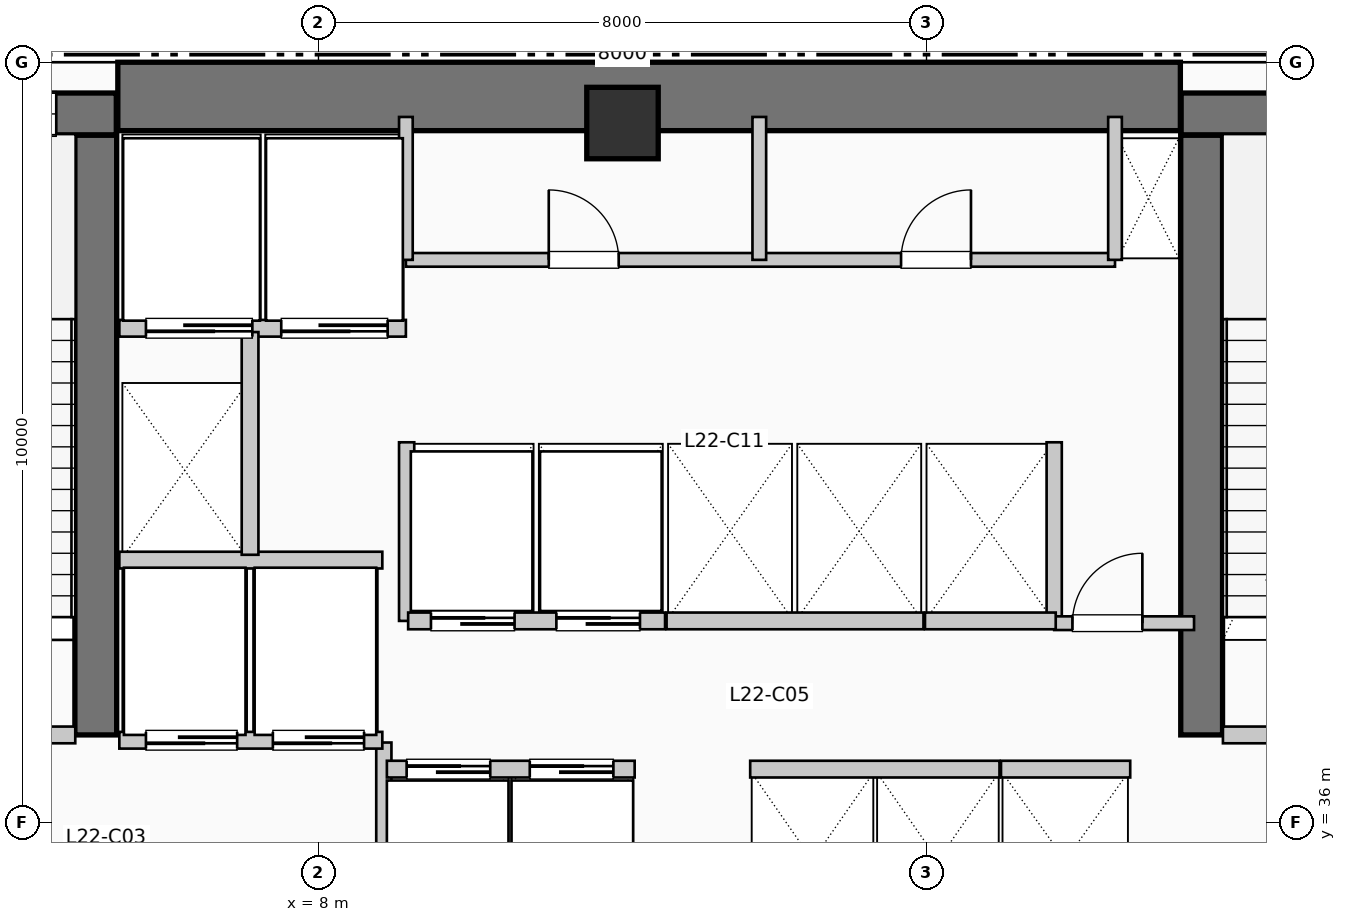
"""IFC4 building model, lengths in metres.
Left out: names, types, materials, properties, quantities, classifications, styles, units other than length and angle.
Written with IfcOpenShell. Run it as: python <this file> out.ifc"""

import sys

from ifc_helpers import new_model, si_unit, direction, frame, frame_2d, origin, origin_2d, place, context, subcontext, project, spatial, rectangle, extrude, element, fill, save


model = new_model("IFC4")
c1 = context("Model", 3, precision=1e-05, world=origin(), true_north=direction((0.0, 1.0)))
c2 = subcontext(c1, "Body", "Model", "MODEL_VIEW")
j1 = project(units=[si_unit("LENGTHUNIT", "METRE"), si_unit("PLANEANGLEUNIT", "RADIAN")], contexts=[c1])
p1 = place(None, origin())
s1 = spatial("IfcSite", under=j1, at=p1, CompositionType="ELEMENT")
p2 = place(p1, origin())
s2 = spatial("IfcBuilding", under=s1, at=p2, CompositionType="ELEMENT")
p3 = place(p2, frame((0.0, 0.0, 93.72)))
s3 = spatial("IfcBuildingStorey", under=s2, at=p3, CompositionType="ELEMENT", Elevation=93.72)
p4 = place(p3, frame((5.36, 45.55, 0.0), z_axis=(0.0, 0.0, 1.0), x_axis=(1.0, 0.0, 0.0)))
e1 = element("IfcWall", 1, at=p4, inside=s3, PredefinedType="SHEAR", context=c2, shape_type="SweptSolid", body=[
    extrude(rectangle(XDim=13.98, YDim=0.9, at=frame_2d((6.99, 0.0))), origin(), (0.0, 0.0, 1.0), 4.95),
])
p5 = place(p3, frame((5.07, 37.15, 0.0), z_axis=(0.0, 0.0, 1.0), x_axis=(0.0, 1.0, 0.0)))
e2 = element("IfcWall", 2, at=p5, inside=s3, PredefinedType="SHEAR", context=c2, shape_type="SweptSolid", body=[
    extrude(rectangle(XDim=7.89, YDim=0.55, at=frame_2d((3.945, 0.0))), origin(), (0.0, 0.0, 1.0), 4.95),
])
p6 = place(p3, frame((1.1, 45.32, 0.0), z_axis=(0.0, 0.0, 1.0), x_axis=(1.0, 0.0, 0.0)))
e3 = element("IfcWall", 3, at=p6, inside=s3, PredefinedType="SHEAR", context=c2, shape_type="SweptSolid", body=[
    extrude(rectangle(XDim=4.24, YDim=0.55, at=frame_2d((2.12, 0.0))), origin(), (0.0, 0.0, 1.0), 4.95),
])
p7 = place(p6, frame((2.05, 0.0, 1.05)))
e4 = element("IfcOpeningElement", 4, at=p7, cuts=e3, PredefinedType="OPENING", context=c2, shape_type="SweptSolid", body=[
    extrude(rectangle(XDim=1.4, YDim=1.8, at=frame_2d((0.7, 0.9))), frame((0.0, 0.285, 0.0), z_axis=(0.0, -1.0, 0.0), x_axis=(1.0, 0.0, 0.0)), (0.0, 0.0, 1.0), 0.57),
])
p8 = place(p3, frame((19.62, 37.15, 0.0), z_axis=(0.0, 0.0, 1.0), x_axis=(0.0, 1.0, 0.0)))
e5 = element("IfcWall", 5, at=p8, inside=s3, PredefinedType="SHEAR", context=c2, shape_type="SweptSolid", body=[
    extrude(rectangle(XDim=7.89, YDim=0.55, at=frame_2d((3.945, 0.0))), origin(), (0.0, 0.0, 1.0), 4.95),
])
p9 = place(p3, frame((19.35, 45.32, 0.0), z_axis=(0.0, 0.0, 1.0), x_axis=(1.0, 0.0, 0.0)))
e6 = element("IfcWall", 6, at=p9, inside=s3, PredefinedType="SHEAR", context=c2, shape_type="SweptSolid", body=[
    extrude(rectangle(XDim=3.69, YDim=0.55, at=frame_2d((1.845, 0.0))), origin(), (0.0, 0.0, 1.0), 4.95),
])
p10 = place(p9, frame((1.15, 0.0, 1.05)))
e7 = element("IfcOpeningElement", 7, at=p10, cuts=e6, PredefinedType="OPENING", context=c2, shape_type="SweptSolid", body=[
    extrude(rectangle(XDim=1.4, YDim=1.8, at=frame_2d((0.7, 0.9))), frame((0.0, 0.285, 0.0), z_axis=(0.0, -1.0, 0.0), x_axis=(1.0, 0.0, 0.0)), (0.0, 0.0, 1.0), 0.57),
])
p11 = place(p3, frame((12.0, 45.2, 0.0), z_axis=(0.0, 0.0, 1.0), x_axis=(1.0, 0.0, 0.0)))
e8 = element("IfcColumn", 8, at=p11, inside=s3, PredefinedType="COLUMN", context=c2, shape_type="SweptSolid", body=[
    extrude(rectangle(XDim=0.94, YDim=0.94, at=origin_2d()), origin(), (0.0, 0.0, 1.0), 4.95),
])
p12 = place(p3, frame((1.65, 37.15, 0.0), z_axis=(0.0, 0.0, 1.0), x_axis=(1.0, 0.0, 0.0)))
e9 = element("IfcWall", 9, at=p12, inside=s3, PredefinedType="PARTITIONING", context=c2, shape_type="SweptSolid", body=[
    extrude(rectangle(XDim=3.15, YDim=0.22, at=frame_2d((1.575, 0.0))), origin(), (0.0, 0.0, 1.0), 4.7),
])
p13 = place(p12, frame((2.05, 0.0, 0.0), z_axis=(0.0, 0.0, 1.0), x_axis=(-1.0, 0.0, 0.0)))
e10 = element("IfcOpeningElement", 10, at=p13, cuts=e9, PredefinedType="OPENING", context=c2, shape_type="SweptSolid", body=[
    extrude(rectangle(XDim=1.05, YDim=2.15, at=frame_2d((0.525, 1.075))), frame((0.0, 0.12, 0.0), z_axis=(0.0, -1.0, 0.0), x_axis=(1.0, 0.0, 0.0)), (0.0, 0.0, 1.0), 0.24),
])
p14 = place(p3, frame((8.86, 34.55, 0.0), z_axis=(0.0, 0.0, 1.0), x_axis=(0.0, 1.0, 0.0)))
e11 = element("IfcWall", 11, at=p14, inside=s3, PredefinedType="PARTITIONING", context=c2, shape_type="SweptSolid", body=[
    extrude(rectangle(XDim=2.5, YDim=0.2, at=frame_2d((1.25, 0.0))), origin(), (0.0, 0.0, 1.0), 4.7),
])
p15 = place(p3, frame((19.9, 37.15, 0.0), z_axis=(0.0, 0.0, 1.0), x_axis=(1.0, 0.0, 0.0)))
e12 = element("IfcWall", 12, at=p15, inside=s3, PredefinedType="PARTITIONING", context=c2, shape_type="SweptSolid", body=[
    extrude(rectangle(XDim=3.15, YDim=0.22, at=frame_2d((1.575, 0.0))), origin(), (0.0, 0.0, 1.0), 4.7),
])
p16 = place(p15, frame((2.05, 0.0, 0.0), z_axis=(0.0, 0.0, 1.0), x_axis=(-1.0, 0.0, 0.0)))
e13 = element("IfcOpeningElement", 13, at=p16, cuts=e12, PredefinedType="OPENING", context=c2, shape_type="SweptSolid", body=[
    extrude(rectangle(XDim=1.05, YDim=2.15, at=frame_2d((0.525, 1.075))), frame((0.0, 0.12, 0.0), z_axis=(0.0, -1.0, 0.0), x_axis=(1.0, 0.0, 0.0)), (0.0, 0.0, 1.0), 0.24),
])
p17 = place(p3, frame((5.38, 37.08, 0.0), z_axis=(0.0, 0.0, 1.0), x_axis=(1.0, 0.0, 0.0)))
e14 = element("IfcWall", 14, at=p17, inside=s3, PredefinedType="PARTITIONING", context=c2, shape_type="SweptSolid", body=[
    extrude(rectangle(XDim=3.46, YDim=0.22, at=frame_2d((1.73, 0.0))), origin(), (0.0, 0.0, 1.0), 4.7),
])
p18 = place(p17, frame((1.55, 0.0, 0.0), z_axis=(0.0, 0.0, 1.0), x_axis=(-1.0, 0.0, 0.0)))
e15 = element("IfcOpeningElement", 15, at=p18, cuts=e14, PredefinedType="OPENING", context=c2, shape_type="SweptSolid", body=[
    extrude(rectangle(XDim=1.2, YDim=2.2, at=frame_2d((0.6, 1.1))), frame((0.0, 0.12, 0.0), z_axis=(0.0, -1.0, 0.0), x_axis=(1.0, 0.0, 0.0)), (0.0, 0.0, 1.0), 0.24),
])
p19 = place(p17, frame((3.22, 0.0, 0.0), z_axis=(0.0, 0.0, 1.0), x_axis=(-1.0, 0.0, 0.0)))
e16 = element("IfcOpeningElement", 16, at=p19, cuts=e14, PredefinedType="OPENING", context=c2, shape_type="SweptSolid", body=[
    extrude(rectangle(XDim=1.2, YDim=2.2, at=frame_2d((0.6, 1.1))), frame((0.0, 0.12, 0.0), z_axis=(0.0, -1.0, 0.0), x_axis=(1.0, 0.0, 0.0)), (0.0, 0.0, 1.0), 0.24),
])
p20 = place(p3, frame((5.38, 39.45, 0.0), z_axis=(0.0, 0.0, 1.0), x_axis=(1.0, 0.0, 0.0)))
e17 = element("IfcWall", 17, at=p20, inside=s3, PredefinedType="PARTITIONING", context=c2, shape_type="SweptSolid", body=[
    extrude(rectangle(XDim=3.46, YDim=0.22, at=frame_2d((1.73, 0.0))), origin(), (0.0, 0.0, 1.0), 4.7),
])
p21 = place(p3, frame((5.38, 42.5, 0.0), z_axis=(0.0, 0.0, 1.0), x_axis=(1.0, 0.0, 0.0)))
e18 = element("IfcWall", 18, at=p21, inside=s3, PredefinedType="PARTITIONING", context=c2, shape_type="SweptSolid", body=[
    extrude(rectangle(XDim=3.77, YDim=0.22, at=frame_2d((1.885, 0.0))), origin(), (0.0, 0.0, 1.0), 4.7),
])
p22 = place(p21, frame((1.75, 0.0, 0.0), z_axis=(0.0, 0.0, 1.0), x_axis=(-1.0, 0.0, 0.0)))
e19 = element("IfcOpeningElement", 19, at=p22, cuts=e18, PredefinedType="OPENING", context=c2, shape_type="SweptSolid", body=[
    extrude(rectangle(XDim=1.4, YDim=2.2, at=frame_2d((0.7, 1.1))), frame((0.0, 0.12, 0.0), z_axis=(0.0, -1.0, 0.0), x_axis=(1.0, 0.0, 0.0)), (0.0, 0.0, 1.0), 0.24),
])
p23 = place(p21, frame((3.53, 0.0, 0.0), z_axis=(0.0, 0.0, 1.0), x_axis=(-1.0, 0.0, 0.0)))
e20 = element("IfcOpeningElement", 20, at=p23, cuts=e18, PredefinedType="OPENING", context=c2, shape_type="SweptSolid", body=[
    extrude(rectangle(XDim=1.4, YDim=2.2, at=frame_2d((0.7, 1.1))), frame((0.0, 0.12, 0.0), z_axis=(0.0, -1.0, 0.0), x_axis=(1.0, 0.0, 0.0)), (0.0, 0.0, 1.0), 0.24),
])
p24 = place(p3, frame((7.1, 39.52, 0.0), z_axis=(0.0, 0.0, 1.0), x_axis=(0.0, 1.0, 0.0)))
e21 = element("IfcWall", 21, at=p24, inside=s3, PredefinedType="PARTITIONING", context=c2, shape_type="SweptSolid", body=[
    extrude(rectangle(XDim=2.93, YDim=0.22, at=frame_2d((1.465, 0.0))), origin(), (0.0, 0.0, 1.0), 4.7),
])
for number, where, z_axis, x_axis in (
    (22, (9.16, 38.65, 0.0), (0.0, 0.0, 1.0), (0.0, 1.0, 0.0)),
    (23, (17.68, 38.65, 0.0), (0.0, 0.0, 1.0), (0.0, 1.0, 0.0)),
):
    element("IfcWall", number, at=place(p3, frame(where, z_axis=z_axis, x_axis=x_axis)), inside=s3, PredefinedType="PARTITIONING", context=c2, shape_type="SweptSolid", body=[
        extrude(rectangle(XDim=2.35, YDim=0.2, at=frame_2d((1.175, 0.0))), origin(), (0.0, 0.0, 1.0), 4.7),
    ])
p25 = place(p3, frame((17.68, 38.62, 0.0), z_axis=(0.0, 0.0, 1.0), x_axis=(1.0, 0.0, 0.0)))
e24 = element("IfcWall", 24, at=p25, inside=s3, PredefinedType="PARTITIONING", context=c2, shape_type="SweptSolid", body=[
    extrude(rectangle(XDim=1.84, YDim=0.18, at=frame_2d((0.92, 0.0))), origin(), (0.0, 0.0, 1.0), 4.7),
])
p26 = place(p25, frame((0.24, 0.0, 0.0)))
e25 = element("IfcOpeningElement", 25, at=p26, cuts=e24, PredefinedType="OPENING", context=c2, shape_type="SweptSolid", body=[
    extrude(rectangle(XDim=0.92, YDim=2.1, at=frame_2d((0.46, 1.05))), frame((0.0, 0.1, 0.0), z_axis=(0.0, -1.0, 0.0), x_axis=(1.0, 0.0, 0.0)), (0.0, 0.0, 1.0), 0.2),
])
p27 = place(p3, frame((8.9, 36.7, 0.0), z_axis=(0.0, 0.0, 1.0), x_axis=(1.0, 0.0, 0.0)))
e26 = element("IfcWall", 26, at=p27, inside=s3, PredefinedType="PARTITIONING", context=c2, shape_type="SweptSolid", body=[
    extrude(rectangle(XDim=3.26, YDim=0.22, at=frame_2d((1.63, 0.0))), origin(), (0.0, 0.0, 1.0), 4.7),
])
p28 = place(p27, frame((0.26, 0.0, 0.0)))
e27 = element("IfcOpeningElement", 27, at=p28, cuts=e26, PredefinedType="OPENING", context=c2, shape_type="SweptSolid", body=[
    extrude(rectangle(XDim=1.1, YDim=2.2, at=frame_2d((0.55, 1.1))), frame((0.0, 0.12, 0.0), z_axis=(0.0, -1.0, 0.0), x_axis=(1.0, 0.0, 0.0)), (0.0, 0.0, 1.0), 0.24),
])
p29 = place(p27, frame((1.88, 0.0, 0.0)))
e28 = element("IfcOpeningElement", 28, at=p29, cuts=e26, PredefinedType="OPENING", context=c2, shape_type="SweptSolid", body=[
    extrude(rectangle(XDim=1.1, YDim=2.2, at=frame_2d((0.55, 1.1))), frame((0.0, 0.12, 0.0), z_axis=(0.0, -1.0, 0.0), x_axis=(1.0, 0.0, 0.0)), (0.0, 0.0, 1.0), 0.24),
])
p30 = place(p3, frame((9.18, 38.65, 0.0), z_axis=(0.0, 0.0, 1.0), x_axis=(1.0, 0.0, 0.0)))
e29 = element("IfcWall", 29, at=p30, inside=s3, PredefinedType="PARTITIONING", context=c2, shape_type="SweptSolid", body=[
    extrude(rectangle(XDim=3.38, YDim=0.22, at=frame_2d((1.69, 0.0))), origin(), (0.0, 0.0, 1.0), 4.7),
])
p31 = place(p30, frame((0.3, 0.0, 0.0)))
e30 = element("IfcOpeningElement", 30, at=p31, cuts=e29, PredefinedType="OPENING", context=c2, shape_type="SweptSolid", body=[
    extrude(rectangle(XDim=1.1, YDim=2.2, at=frame_2d((0.55, 1.1))), frame((0.0, 0.12, 0.0), z_axis=(0.0, -1.0, 0.0), x_axis=(1.0, 0.0, 0.0)), (0.0, 0.0, 1.0), 0.24),
])
p32 = place(p30, frame((1.95, 0.0, 0.0)))
e31 = element("IfcOpeningElement", 31, at=p32, cuts=e29, PredefinedType="OPENING", context=c2, shape_type="SweptSolid", body=[
    extrude(rectangle(XDim=1.1, YDim=2.2, at=frame_2d((0.55, 1.1))), frame((0.0, 0.12, 0.0), z_axis=(0.0, -1.0, 0.0), x_axis=(1.0, 0.0, 0.0)), (0.0, 0.0, 1.0), 0.24),
])
p33 = place(p3, frame((13.68, 36.7, 0.0), z_axis=(0.0, 0.0, 1.0), x_axis=(1.0, 0.0, 0.0)))
e32 = element("IfcWall", 32, at=p33, inside=s3, PredefinedType="PARTITIONING", context=c2, shape_type="SweptSolid", body=[
    extrude(rectangle(XDim=3.28, YDim=0.22, at=frame_2d((1.64, 0.0))), origin(), (0.0, 0.0, 1.0), 4.7),
])
p34 = place(p3, frame((12.58, 38.65, 0.0), z_axis=(0.0, 0.0, 1.0), x_axis=(1.0, 0.0, 0.0)))
e33 = element("IfcWall", 33, at=p34, inside=s3, PredefinedType="PARTITIONING", context=c2, shape_type="SweptSolid", body=[
    extrude(rectangle(XDim=3.38, YDim=0.22, at=frame_2d((1.69, 0.0))), origin(), (0.0, 0.0, 1.0), 4.7),
])
p35 = place(p3, frame((16.98, 36.7, 0.0), z_axis=(0.0, 0.0, 1.0), x_axis=(1.0, 0.0, 0.0)))
e34 = element("IfcWall", 34, at=p35, inside=s3, PredefinedType="PARTITIONING", context=c2, shape_type="SweptSolid", body=[
    extrude(rectangle(XDim=1.7, YDim=0.22, at=frame_2d((0.85, 0.0))), origin(), (0.0, 0.0, 1.0), 4.7),
])
p36 = place(p3, frame((15.98, 38.65, 0.0), z_axis=(0.0, 0.0, 1.0), x_axis=(1.0, 0.0, 0.0)))
e35 = element("IfcWall", 35, at=p36, inside=s3, PredefinedType="PARTITIONING", context=c2, shape_type="SweptSolid", body=[
    extrude(rectangle(XDim=1.72, YDim=0.22, at=frame_2d((0.86, 0.0))), origin(), (0.0, 0.0, 1.0), 4.7),
])
p37 = place(p3, frame((9.15, 43.4, 0.0), z_axis=(0.0, 0.0, 1.0), x_axis=(1.0, 0.0, 0.0)))
e36 = element("IfcWall", 36, at=p37, inside=s3, PredefinedType="PLUMBINGWALL", context=c2, shape_type="SweptSolid", body=[
    extrude(rectangle(XDim=9.33, YDim=0.18, at=frame_2d((4.665, 0.0))), origin(), (0.0, 0.0, 1.0), 4.7),
])
p38 = place(p37, frame((1.88, 0.0, 0.0)))
e37 = element("IfcOpeningElement", 37, at=p38, cuts=e36, PredefinedType="OPENING", context=c2, shape_type="SweptSolid", body=[
    extrude(rectangle(XDim=0.92, YDim=2.1, at=frame_2d((0.46, 1.05))), frame((0.0, 0.1, 0.0), z_axis=(0.0, -1.0, 0.0), x_axis=(1.0, 0.0, 0.0)), (0.0, 0.0, 1.0), 0.2),
])
p39 = place(p37, frame((6.515, 0.0, 0.0)))
e38 = element("IfcOpeningElement", 38, at=p39, cuts=e36, PredefinedType="OPENING", context=c2, shape_type="SweptSolid", body=[
    extrude(rectangle(XDim=0.92, YDim=2.1, at=frame_2d((0.46, 1.05))), frame((0.0, 0.1, 0.0), z_axis=(0.0, -1.0, 0.0), x_axis=(1.0, 0.0, 0.0)), (0.0, 0.0, 1.0), 0.2),
])
for number, where, z_axis, x_axis in (
    (39, (9.15, 43.4, 0.0), (0.0, 0.0, 1.0), (0.0, 1.0, 0.0)),
    (40, (18.48, 43.4, 0.0), (0.0, 0.0, 1.0), (0.0, 1.0, 0.0)),
    (41, (13.8, 43.4, 0.0), (0.0, 0.0, 1.0), (0.0, 1.0, 0.0)),
):
    element("IfcWall", number, at=place(p3, frame(where, z_axis=z_axis, x_axis=x_axis)), inside=s3, PredefinedType="PLUMBINGWALL", context=c2, shape_type="SweptSolid", body=[
        extrude(rectangle(XDim=1.88, YDim=0.18, at=frame_2d((0.94, 0.0))), origin(), (0.0, 0.0, 1.0), 4.7),
    ])
p40 = place(p7, origin())
e42 = element("IfcWindow", 42, at=p40, inside=s3, PartitioningType="SINGLE_PANEL", PredefinedType="WINDOW", context=c2, shape_type="SweptSolid", body=[
    extrude(rectangle(XDim=1.4, YDim=1.8, at=frame_2d((0.7, 0.9))), frame((0.0, 0.03, 0.0), z_axis=(0.0, -1.0, 0.0), x_axis=(1.0, 0.0, 0.0)), (0.0, 0.0, 1.0), 0.06),
])
fill(e4, e42)
p41 = place(p18, origin())
e43 = element("IfcDoor", 43, at=p41, inside=s3, OperationType="SLIDING_TO_RIGHT", PredefinedType="DOOR", context=c2, shape_type="SweptSolid", body=[
    extrude(rectangle(XDim=1.2, YDim=2.2, at=frame_2d((0.6, 1.1))), frame((0.0, 0.025, 0.0), z_axis=(0.0, -1.0, 0.0), x_axis=(1.0, 0.0, 0.0)), (0.0, 0.0, 1.0), 0.05),
])
fill(e15, e43)
p42 = place(p19, origin())
e44 = element("IfcDoor", 44, at=p42, inside=s3, OperationType="SLIDING_TO_RIGHT", PredefinedType="DOOR", context=c2, shape_type="SweptSolid", body=[
    extrude(rectangle(XDim=1.2, YDim=2.2, at=frame_2d((0.6, 1.1))), frame((0.0, 0.025, 0.0), z_axis=(0.0, -1.0, 0.0), x_axis=(1.0, 0.0, 0.0)), (0.0, 0.0, 1.0), 0.05),
])
fill(e16, e44)
p43 = place(p22, origin())
e45 = element("IfcDoor", 45, at=p43, inside=s3, OperationType="SLIDING_TO_LEFT", PredefinedType="DOOR", context=c2, shape_type="SweptSolid", body=[
    extrude(rectangle(XDim=1.4, YDim=2.2, at=frame_2d((0.7, 1.1))), frame((0.0, 0.025, 0.0), z_axis=(0.0, -1.0, 0.0), x_axis=(1.0, 0.0, 0.0)), (0.0, 0.0, 1.0), 0.05),
])
fill(e19, e45)
p44 = place(p23, origin())
e46 = element("IfcDoor", 46, at=p44, inside=s3, OperationType="SLIDING_TO_LEFT", PredefinedType="DOOR", context=c2, shape_type="SweptSolid", body=[
    extrude(rectangle(XDim=1.4, YDim=2.2, at=frame_2d((0.7, 1.1))), frame((0.0, 0.025, 0.0), z_axis=(0.0, -1.0, 0.0), x_axis=(1.0, 0.0, 0.0)), (0.0, 0.0, 1.0), 0.05),
])
fill(e20, e46)
p45 = place(p26, origin())
e47 = element("IfcDoor", 47, at=p45, inside=s3, OperationType="SINGLE_SWING_RIGHT", PredefinedType="DOOR", context=c2, shape_type="SweptSolid", body=[
    extrude(rectangle(XDim=0.92, YDim=2.1, at=frame_2d((0.46, 1.05))), frame((0.0, 0.025, 0.0), z_axis=(0.0, -1.0, 0.0), x_axis=(1.0, 0.0, 0.0)), (0.0, 0.0, 1.0), 0.05),
])
fill(e25, e47)
p46 = place(p28, origin())
e48 = element("IfcDoor", 48, at=p46, inside=s3, OperationType="SLIDING_TO_LEFT", PredefinedType="DOOR", context=c2, shape_type="SweptSolid", body=[
    extrude(rectangle(XDim=1.1, YDim=2.2, at=frame_2d((0.55, 1.1))), frame((0.0, 0.025, 0.0), z_axis=(0.0, -1.0, 0.0), x_axis=(1.0, 0.0, 0.0)), (0.0, 0.0, 1.0), 0.05),
])
fill(e27, e48)
p47 = place(p29, origin())
e49 = element("IfcDoor", 49, at=p47, inside=s3, OperationType="SLIDING_TO_LEFT", PredefinedType="DOOR", context=c2, shape_type="SweptSolid", body=[
    extrude(rectangle(XDim=1.1, YDim=2.2, at=frame_2d((0.55, 1.1))), frame((0.0, 0.025, 0.0), z_axis=(0.0, -1.0, 0.0), x_axis=(1.0, 0.0, 0.0)), (0.0, 0.0, 1.0), 0.05),
])
fill(e28, e49)
p48 = place(p31, origin())
e50 = element("IfcDoor", 50, at=p48, inside=s3, OperationType="SLIDING_TO_LEFT", PredefinedType="DOOR", context=c2, shape_type="SweptSolid", body=[
    extrude(rectangle(XDim=1.1, YDim=2.2, at=frame_2d((0.55, 1.1))), frame((0.0, 0.025, 0.0), z_axis=(0.0, -1.0, 0.0), x_axis=(1.0, 0.0, 0.0)), (0.0, 0.0, 1.0), 0.05),
])
fill(e30, e50)
p49 = place(p32, origin())
e51 = element("IfcDoor", 51, at=p49, inside=s3, OperationType="SLIDING_TO_LEFT", PredefinedType="DOOR", context=c2, shape_type="SweptSolid", body=[
    extrude(rectangle(XDim=1.1, YDim=2.2, at=frame_2d((0.55, 1.1))), frame((0.0, 0.025, 0.0), z_axis=(0.0, -1.0, 0.0), x_axis=(1.0, 0.0, 0.0)), (0.0, 0.0, 1.0), 0.05),
])
fill(e31, e51)
p50 = place(p38, origin())
e52 = element("IfcDoor", 52, at=p50, inside=s3, OperationType="SINGLE_SWING_LEFT", PredefinedType="DOOR", context=c2, shape_type="SweptSolid", body=[
    extrude(rectangle(XDim=0.92, YDim=2.1, at=frame_2d((0.46, 1.05))), frame((0.0, 0.025, 0.0), z_axis=(0.0, -1.0, 0.0), x_axis=(1.0, 0.0, 0.0)), (0.0, 0.0, 1.0), 0.05),
])
fill(e37, e52)
p51 = place(p39, origin())
e53 = element("IfcDoor", 53, at=p51, inside=s3, OperationType="SINGLE_SWING_RIGHT", PredefinedType="DOOR", context=c2, shape_type="SweptSolid", body=[
    extrude(rectangle(XDim=0.92, YDim=2.1, at=frame_2d((0.46, 1.05))), frame((0.0, 0.025, 0.0), z_axis=(0.0, -1.0, 0.0), x_axis=(1.0, 0.0, 0.0)), (0.0, 0.0, 1.0), 0.05),
])
fill(e38, e53)
save(model, sys.argv[1])
